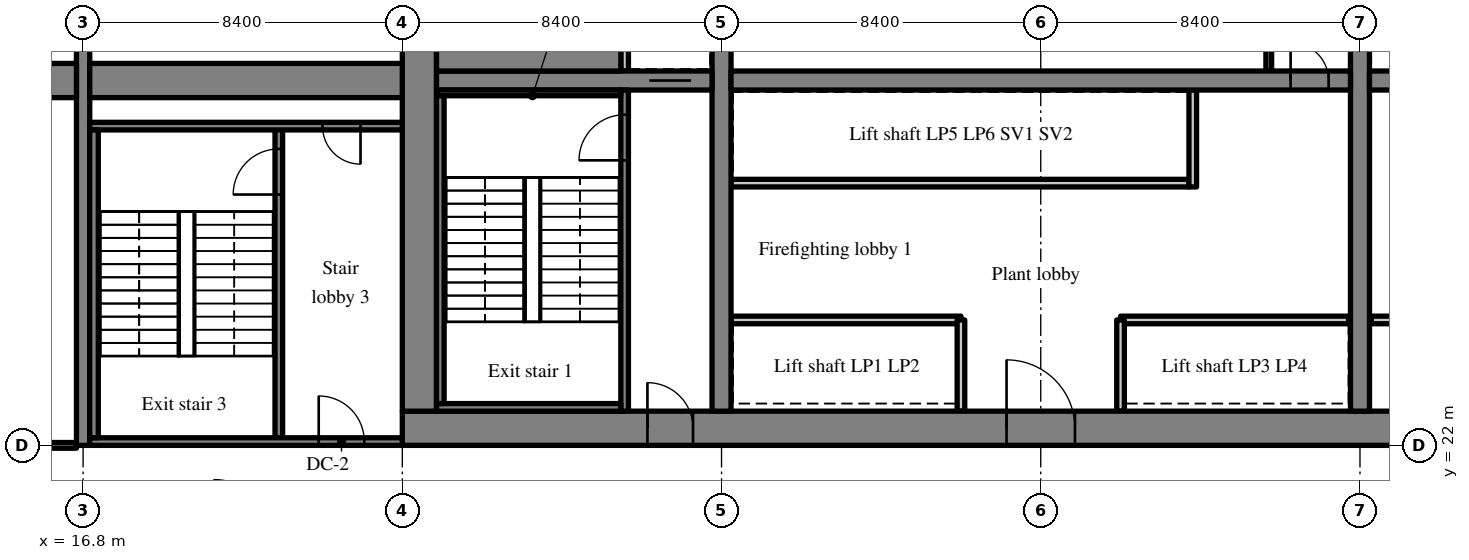
"""IFC4 building model, lengths in metres.
Left out: names, types, materials, properties, quantities, classifications, styles, units other than length and angle.
Written with IfcOpenShell. Run it as: python <this file> out.ifc"""

import sys

from ifc_helpers import new_model, si_unit, direction, frame, frame_2d, origin, place, context, subcontext, project, spatial, rectangle, extrude, source, transform, mapped, element, fill, save


model = new_model("IFC4")
c1 = context("Model", 3, precision=1e-05, world=origin(), true_north=direction((0.0, 1.0)))
c2 = subcontext(c1, "Body", "Model", "MODEL_VIEW")
j1 = project(units=[si_unit("LENGTHUNIT", "METRE"), si_unit("PLANEANGLEUNIT", "RADIAN")], contexts=[c1])
p1 = place(None, origin())
s1 = spatial("IfcSite", under=j1, at=p1, CompositionType="ELEMENT")
p2 = place(p1, origin())
s2 = spatial("IfcBuilding", under=s1, at=p2, CompositionType="ELEMENT")
p3 = place(p2, frame((0.0, 0.0, 140.8)))
s3 = spatial("IfcBuildingStorey", under=s2, at=p3, CompositionType="ELEMENT", Elevation=140.8)
m1 = source(origin(), c2, "Body", "SweptSolid", [
    extrude(rectangle(XDim=50.4, YDim=0.9, at=frame_2d((25.2, 0.0))), origin(), (0.0, 0.0, 1.0), 5.12),
])
p4 = place(p3, frame((25.2, 22.45, 0.0), z_axis=(0.0, 0.0, 1.0), x_axis=(1.0, 0.0, 0.0)))
e1 = element("IfcWall", 1, at=p4, inside=s3, PredefinedType="SHEAR", context=c2, shape_type="MappedRepresentation", body=[
    mapped(m1, transform((0.0, 0.0, 0.0), scale=1.0)),
])
m2 = source(origin(), c2, "Body", "SweptSolid", [
    extrude(rectangle(XDim=1.8, YDim=2.1, at=frame_2d((0.9, 1.05))), frame((0.0, 0.46, 0.0), z_axis=(0.0, -1.0, 0.0), x_axis=(1.0, 0.0, 0.0)), (0.0, 0.0, 1.0), 0.92),
])
p5 = place(p4, frame((15.9, 0.0, 0.0)))
e2 = element("IfcOpeningElement", 2, at=p5, cuts=e1, PredefinedType="OPENING", context=c2, shape_type="MappedRepresentation", body=[
    mapped(m2, transform((0.0, 0.0, 0.0), scale=1.0)),
])
p6 = place(p4, frame((32.7, 0.0, 0.0)))
e3 = element("IfcOpeningElement", 3, at=p6, cuts=e1, PredefinedType="OPENING", context=c2, shape_type="MappedRepresentation", body=[
    mapped(m2, transform((0.0, 0.0, 0.0), scale=1.0)),
])
m3 = source(origin(), c2, "Body", "SweptSolid", [
    extrude(rectangle(XDim=1.2, YDim=2.1, at=frame_2d((0.6, 1.05))), frame((0.0, 0.46, 0.0), z_axis=(0.0, -1.0, 0.0), x_axis=(1.0, 0.0, 0.0)), (0.0, 0.0, 1.0), 0.92),
])
p7 = place(p4, frame((6.45, 0.0, 0.0)))
e4 = element("IfcOpeningElement", 4, at=p7, cuts=e1, PredefinedType="OPENING", context=c2, shape_type="MappedRepresentation", body=[
    mapped(m3, transform((0.0, 0.0, 0.0), scale=1.0)),
])
p8 = place(p4, frame((47.775, 0.0, 0.0)))
e5 = element("IfcOpeningElement", 5, at=p8, cuts=e1, PredefinedType="OPENING", context=c2, shape_type="MappedRepresentation", body=[
    mapped(m3, transform((0.0, 0.0, 0.0), scale=1.0)),
])
m4 = source(origin(), c2, "Body", "SweptSolid", [
    extrude(rectangle(XDim=18.2, YDim=0.9, at=frame_2d((9.1, 0.0))), origin(), (0.0, 0.0, 1.0), 5.12),
])
p9 = place(p3, frame((25.65, 22.9, 0.0), z_axis=(0.0, 0.0, 1.0), x_axis=(0.0, 1.0, 0.0)))
e6 = element("IfcWall", 6, at=p9, inside=s3, PredefinedType="SHEAR", context=c2, shape_type="MappedRepresentation", body=[
    mapped(m4, transform((0.0, 0.0, 0.0), scale=1.0)),
])
p10 = place(p9, frame((16.3, 0.0, 0.0)))
e7 = element("IfcOpeningElement", 7, at=p10, cuts=e6, PredefinedType="OPENING", context=c2, shape_type="MappedRepresentation", body=[
    mapped(m3, transform((0.0, 0.0, 0.0), scale=1.0)),
])
m5 = source(origin(), c2, "Body", "SweptSolid", [
    extrude(rectangle(XDim=18.2, YDim=0.5, at=frame_2d((9.1, 0.0))), origin(), (0.0, 0.0, 1.0), 5.12),
])
p11 = place(p3, frame((33.6, 22.9, 0.0), z_axis=(0.0, 0.0, 1.0), x_axis=(0.0, 1.0, 0.0)))
e8 = element("IfcWall", 8, at=p11, inside=s3, PredefinedType="SHEAR", context=c2, shape_type="MappedRepresentation", body=[
    mapped(m5, transform((0.0, 0.0, 0.0), scale=1.0)),
])
m6 = source(origin(), c2, "Body", "SweptSolid", [
    extrude(rectangle(XDim=1.1, YDim=2.1, at=frame_2d((0.55, 1.05))), frame((0.0, 0.26, 0.0), z_axis=(0.0, -1.0, 0.0), x_axis=(1.0, 0.0, 0.0)), (0.0, 0.0, 1.0), 0.52),
])
p12 = place(p11, frame((12.55, 0.0, 0.0)))
e9 = element("IfcOpeningElement", 9, at=p12, cuts=e8, PredefinedType="OPENING", context=c2, shape_type="MappedRepresentation", body=[
    mapped(m6, transform((0.0, 0.0, 0.0), scale=1.0)),
])
p13 = place(p3, frame((50.4, 22.9, 0.0), z_axis=(0.0, 0.0, 1.0), x_axis=(0.0, 1.0, 0.0)))
e10 = element("IfcWall", 10, at=p13, inside=s3, PredefinedType="SHEAR", context=c2, shape_type="MappedRepresentation", body=[
    mapped(m5, transform((0.0, 0.0, 0.0), scale=1.0)),
])
p14 = place(p13, frame((12.55, 0.0, 0.0)))
e11 = element("IfcOpeningElement", 11, at=p14, cuts=e10, PredefinedType="OPENING", context=c2, shape_type="MappedRepresentation", body=[
    mapped(m6, transform((0.0, 0.0, 0.0), scale=1.0)),
])
m7 = source(origin(), c2, "Body", "SweptSolid", [
    extrude(rectangle(XDim=7.25, YDim=0.5, at=frame_2d((3.625, 0.0))), origin(), (0.0, 0.0, 1.0), 5.12),
])
p15 = place(p3, frame((26.1, 31.6, 0.0), z_axis=(0.0, 0.0, 1.0), x_axis=(1.0, 0.0, 0.0)))
e12 = element("IfcWall", 12, at=p15, inside=s3, PredefinedType="SHEAR", context=c2, shape_type="MappedRepresentation", body=[
    mapped(m7, transform((0.0, 0.0, 0.0), scale=1.0)),
])
p16 = place(p15, frame((5.6, 0.0, 0.0)))
e13 = element("IfcOpeningElement", 13, at=p16, cuts=e12, PredefinedType="OPENING", context=c2, shape_type="MappedRepresentation", body=[
    mapped(m6, transform((0.0, 0.0, 0.0), scale=1.0)),
])
m8 = source(origin(), c2, "Body", "SweptSolid", [
    extrude(rectangle(XDim=16.3, YDim=0.5, at=frame_2d((8.15, 0.0))), origin(), (0.0, 0.0, 1.0), 5.12),
])
p17 = place(p3, frame((33.85, 31.6, 0.0), z_axis=(0.0, 0.0, 1.0), x_axis=(1.0, 0.0, 0.0)))
e14 = element("IfcWall", 14, at=p17, inside=s3, PredefinedType="SHEAR", context=c2, shape_type="MappedRepresentation", body=[
    mapped(m8, transform((0.0, 0.0, 0.0), scale=1.0)),
])
m9 = source(origin(), c2, "Body", "SweptSolid", [
    extrude(rectangle(XDim=1.0, YDim=2.1, at=frame_2d((0.5, 1.05))), frame((0.0, 0.26, 0.0), z_axis=(0.0, -1.0, 0.0), x_axis=(1.0, 0.0, 0.0)), (0.0, 0.0, 1.0), 0.52),
])
p18 = place(p17, frame((14.725, 0.0, 0.0)))
e15 = element("IfcOpeningElement", 15, at=p18, cuts=e14, PredefinedType="OPENING", context=c2, shape_type="MappedRepresentation", body=[
    mapped(m9, transform((0.0, 0.0, 0.0), scale=1.0)),
])
m10 = source(origin(), c2, "Body", "SweptSolid", [
    extrude(rectangle(XDim=16.3, YDim=0.5, at=frame_2d((8.15, 0.0))), origin(), (0.0, 0.0, 1.0), 5.12),
])
p19 = place(p3, frame((50.65, 31.6, 0.0), z_axis=(0.0, 0.0, 1.0), x_axis=(1.0, 0.0, 0.0)))
e16 = element("IfcWall", 16, at=p19, inside=s3, PredefinedType="SHEAR", context=c2, shape_type="MappedRepresentation", body=[
    mapped(m10, transform((0.0, 0.0, 0.0), scale=1.0)),
])
p20 = place(p19, frame((0.575, 0.0, 0.0)))
e17 = element("IfcOpeningElement", 17, at=p20, cuts=e16, PredefinedType="OPENING", context=c2, shape_type="MappedRepresentation", body=[
    mapped(m9, transform((0.0, 0.0, 0.0), scale=1.0)),
])
m11 = source(origin(), c2, "Body", "SweptSolid", [
    extrude(rectangle(XDim=20.0, YDim=0.35, at=frame_2d((10.0, 0.0))), origin(), (0.0, 0.0, 1.0), 5.12),
])
p21 = place(p3, frame((16.8, 22.0, 0.0), z_axis=(0.0, 0.0, 1.0), x_axis=(0.0, 1.0, 0.0)))
e18 = element("IfcWall", 18, at=p21, inside=s3, PredefinedType="SHEAR", context=c2, shape_type="MappedRepresentation", body=[
    mapped(m11, transform((0.0, 0.0, 0.0), scale=1.0)),
])
m12 = source(origin(), c2, "Body", "SweptSolid", [
    extrude(rectangle(XDim=1.2, YDim=2.1, at=frame_2d((0.6, 1.05))), frame((0.0, 0.185, 0.0), z_axis=(0.0, -1.0, 0.0), x_axis=(1.0, 0.0, 0.0)), (0.0, 0.0, 1.0), 0.37),
])
p22 = place(p21, frame((13.4, 0.0, 0.0)))
e19 = element("IfcOpeningElement", 19, at=p22, cuts=e18, PredefinedType="OPENING", context=c2, shape_type="MappedRepresentation", body=[
    mapped(m12, transform((0.0, 0.0, 0.0), scale=1.0)),
])
m13 = source(origin(), c2, "Body", "SweptSolid", [
    extrude(rectangle(XDim=8.05, YDim=0.9, at=frame_2d((4.025, 0.0))), origin(), (0.0, 0.0, 1.0), 5.12),
])
p23 = place(p3, frame((8.575, 31.6, 0.0), z_axis=(0.0, 0.0, 1.0), x_axis=(1.0, 0.0, 0.0)))
e20 = element("IfcWall", 20, at=p23, inside=s3, PredefinedType="SHEAR", context=c2, shape_type="MappedRepresentation", body=[
    mapped(m13, transform((0.0, 0.0, 0.0), scale=1.0)),
])
m14 = source(origin(), c2, "Body", "SweptSolid", [
    extrude(rectangle(XDim=8.225, YDim=0.9, at=frame_2d((4.112, 0.0))), origin(), (0.0, 0.0, 1.0), 5.12),
])
p24 = place(p3, frame((16.975, 31.6, 0.0), z_axis=(0.0, 0.0, 1.0), x_axis=(1.0, 0.0, 0.0)))
e21 = element("IfcWall", 21, at=p24, inside=s3, PredefinedType="SHEAR", context=c2, shape_type="MappedRepresentation", body=[
    mapped(m14, transform((0.0, 0.0, 0.0), scale=1.0)),
])
m15 = source(origin(), c2, "Body", "SweptSolid", [
    extrude(rectangle(XDim=6.05, YDim=0.2, at=frame_2d((3.025, 0.0))), origin(), (0.0, 0.0, 1.0), 5.12),
])
p25 = place(p3, frame((33.85, 25.3, 0.0), z_axis=(0.0, 0.0, 1.0), x_axis=(1.0, 0.0, 0.0)))
e22 = element("IfcWall", 22, at=p25, inside=s3, PredefinedType="SOLIDWALL", context=c2, shape_type="MappedRepresentation", body=[
    mapped(m15, transform((0.0, 0.0, 0.0), scale=1.0)),
])
m16 = source(origin(), c2, "Body", "SweptSolid", [
    extrude(rectangle(XDim=6.0, YDim=0.2, at=frame_2d((3.0, 0.0))), origin(), (0.0, 0.0, 1.0), 5.12),
])
p26 = place(p3, frame((44.1, 25.3, 0.0), z_axis=(0.0, 0.0, 1.0), x_axis=(1.0, 0.0, 0.0)))
e23 = element("IfcWall", 23, at=p26, inside=s3, PredefinedType="SOLIDWALL", context=c2, shape_type="MappedRepresentation", body=[
    mapped(m16, transform((0.0, 0.0, 0.0), scale=1.0)),
])
m17 = source(origin(), c2, "Body", "SweptSolid", [
    extrude(rectangle(XDim=12.05, YDim=0.2, at=frame_2d((6.025, 0.0))), origin(), (0.0, 0.0, 1.0), 5.12),
])
p27 = place(p3, frame((33.85, 28.9, 0.0), z_axis=(0.0, 0.0, 1.0), x_axis=(1.0, 0.0, 0.0)))
e24 = element("IfcWall", 24, at=p27, inside=s3, PredefinedType="SOLIDWALL", context=c2, shape_type="MappedRepresentation", body=[
    mapped(m17, transform((0.0, 0.0, 0.0), scale=1.0)),
])
m18 = source(origin(), c2, "Body", "SweptSolid", [
    extrude(rectangle(XDim=2.4, YDim=0.2, at=frame_2d((1.2, 0.0))), origin(), (0.0, 0.0, 1.0), 5.12),
])
for number, where, z_axis, x_axis in (
    (25, (39.9, 22.9, 0.0), (0.0, 0.0, 1.0), (0.0, 1.0, 0.0)),
    (26, (44.1, 22.9, 0.0), (0.0, 0.0, 1.0), (0.0, 1.0, 0.0)),
):
    element("IfcWall", number, at=place(p3, frame(where, z_axis=z_axis, x_axis=x_axis)), inside=s3, PredefinedType="SOLIDWALL", context=c2, shape_type="MappedRepresentation", body=[
        mapped(m18, transform((0.0, 0.0, 0.0), scale=1.0)),
    ])
m19 = source(origin(), c2, "Body", "SweptSolid", [
    extrude(rectangle(XDim=2.55, YDim=0.2, at=frame_2d((1.275, 0.0))), origin(), (0.0, 0.0, 1.0), 5.12),
])
p28 = place(p3, frame((46.0, 28.8, 0.0), z_axis=(0.0, 0.0, 1.0), x_axis=(0.0, 1.0, 0.0)))
e27 = element("IfcWall", 27, at=p28, inside=s3, PredefinedType="SOLIDWALL", context=c2, shape_type="MappedRepresentation", body=[
    mapped(m19, transform((0.0, 0.0, 0.0), scale=1.0)),
])
m20 = source(origin(), c2, "Body", "SweptSolid", [
    extrude(rectangle(XDim=3.15, YDim=0.15, at=frame_2d((1.575, 0.0))), origin(), (0.0, 0.0, 1.0), 5.12),
])
p29 = place(p3, frame((48.0, 31.85, 0.0), z_axis=(0.0, 0.0, 1.0), x_axis=(0.0, 1.0, 0.0)))
e28 = element("IfcWall", 28, at=p29, inside=s3, PredefinedType="PARTITIONING", context=c2, shape_type="MappedRepresentation", body=[
    mapped(m20, transform((0.0, 0.0, 0.0), scale=1.0)),
])
p30 = place(p3, frame((56.7, 25.3, 0.0), z_axis=(0.0, 0.0, 1.0), x_axis=(-1.0, 0.0, 0.0)))
e29 = element("IfcWall", 29, at=p30, inside=s3, PredefinedType="SOLIDWALL", context=c2, shape_type="MappedRepresentation", body=[
    mapped(m16, transform((0.0, 0.0, 0.0), scale=1.0)),
])
m21 = source(origin(), c2, "Body", "SweptSolid", [
    extrude(rectangle(XDim=8.45, YDim=0.2, at=frame_2d((4.225, 0.0))), origin(), (0.0, 0.0, 1.0), 5.12),
])
p31 = place(p3, frame((31.05, 22.9, 0.0), z_axis=(0.0, 0.0, 1.0), x_axis=(0.0, 1.0, 0.0)))
e30 = element("IfcWall", 30, at=p31, inside=s3, PredefinedType="SOLIDWALL", context=c2, shape_type="MappedRepresentation", body=[
    mapped(m21, transform((0.0, 0.0, 0.0), scale=1.0)),
])
m22 = source(origin(), c2, "Body", "SweptSolid", [
    extrude(rectangle(XDim=1.2, YDim=2.1, at=frame_2d((0.6, 1.05))), frame((0.0, 0.11, 0.0), z_axis=(0.0, -1.0, 0.0), x_axis=(1.0, 0.0, 0.0)), (0.0, 0.0, 1.0), 0.22),
])
p32 = place(p31, frame((6.6, 0.0, 0.0)))
e31 = element("IfcOpeningElement", 31, at=p32, cuts=e30, PredefinedType="OPENING", context=c2, shape_type="MappedRepresentation", body=[
    mapped(m22, transform((0.0, 0.0, 0.0), scale=1.0)),
])
m23 = source(origin(), c2, "Body", "SweptSolid", [
    extrude(rectangle(XDim=1.75, YDim=0.2, at=frame_2d((0.875, 0.0))), origin(), (0.0, 0.0, 1.0), 5.12),
])
p33 = place(p3, frame((31.05, 31.85, 0.0), z_axis=(0.0, 0.0, 1.0), x_axis=(0.0, 1.0, 0.0)))
e32 = element("IfcWall", 32, at=p33, inside=s3, PredefinedType="SOLIDWALL", context=c2, shape_type="MappedRepresentation", body=[
    mapped(m23, transform((0.0, 0.0, 0.0), scale=1.0)),
])
m24 = source(origin(), c2, "Body", "SweptSolid", [
    extrude(rectangle(XDim=8.3, YDim=0.2, at=frame_2d((4.15, 0.0))), origin(), (0.0, 0.0, 1.0), 5.12),
])
p34 = place(p3, frame((21.95, 22.1, 0.0), z_axis=(0.0, 0.0, 1.0), x_axis=(0.0, 1.0, 0.0)))
e33 = element("IfcWall", 33, at=p34, inside=s3, PredefinedType="SOLIDWALL", context=c2, shape_type="MappedRepresentation", body=[
    mapped(m24, transform((0.0, 0.0, 0.0), scale=1.0)),
])
p35 = place(p34, frame((6.5, 0.0, 0.0)))
e34 = element("IfcOpeningElement", 34, at=p35, cuts=e33, PredefinedType="OPENING", context=c2, shape_type="MappedRepresentation", body=[
    mapped(m22, transform((0.0, 0.0, 0.0), scale=1.0)),
])
m25 = source(origin(), c2, "Body", "SweptSolid", [
    extrude(rectangle(XDim=8.225, YDim=0.2, at=frame_2d((4.112, 0.0))), origin(), (0.0, 0.0, 1.0), 5.12),
])
p36 = place(p3, frame((16.975, 22.1, 0.0), z_axis=(0.0, 0.0, 1.0), x_axis=(1.0, 0.0, 0.0)))
e35 = element("IfcWall", 35, at=p36, inside=s3, PredefinedType="SOLIDWALL", context=c2, shape_type="MappedRepresentation", body=[
    mapped(m25, transform((0.0, 0.0, 0.0), scale=1.0)),
])
p37 = place(p36, frame((6.025, 0.0, 0.0)))
e36 = element("IfcOpeningElement", 36, at=p37, cuts=e35, PredefinedType="OPENING", context=c2, shape_type="MappedRepresentation", body=[
    mapped(m22, transform((0.0, 0.0, 0.0), scale=1.0)),
])
p38 = place(p3, frame((25.2, 30.4, 0.0), z_axis=(0.0, 0.0, 1.0), x_axis=(-1.0, 0.0, 0.0)))
e37 = element("IfcWall", 37, at=p38, inside=s3, PredefinedType="SOLIDWALL", context=c2, shape_type="MappedRepresentation", body=[
    mapped(m25, transform((0.0, 0.0, 0.0), scale=1.0)),
])
m26 = source(origin(), c2, "Body", "SweptSolid", [
    extrude(rectangle(XDim=1.0, YDim=2.1, at=frame_2d((0.5, 1.05))), frame((0.0, 0.11, 0.0), z_axis=(0.0, -1.0, 0.0), x_axis=(1.0, 0.0, 0.0)), (0.0, 0.0, 1.0), 0.22),
])
p39 = place(p38, frame((1.1, 0.0, 0.0)))
e38 = element("IfcOpeningElement", 38, at=p39, cuts=e37, PredefinedType="OPENING", context=c2, shape_type="MappedRepresentation", body=[
    mapped(m26, transform((0.0, 0.0, 0.0), scale=1.0)),
])
m27 = source(origin(), c2, "Body", "SweptSolid", [
    extrude(rectangle(XDim=4.85, YDim=0.2, at=frame_2d((2.425, 0.0))), origin(), (0.0, 0.0, 1.0), 5.12),
])
p40 = place(p3, frame((26.1, 23.0, 0.0), z_axis=(0.0, 0.0, 1.0), x_axis=(1.0, 0.0, 0.0)))
e39 = element("IfcWall", 39, at=p40, inside=s3, PredefinedType="SOLIDWALL", context=c2, shape_type="MappedRepresentation", body=[
    mapped(m27, transform((0.0, 0.0, 0.0), scale=1.0)),
])
m28 = source(origin(), c2, "Body", "SweptSolid", [
    extrude(rectangle(XDim=4.85, YDim=0.15, at=frame_2d((2.425, 0.0))), origin(), (0.0, 0.0, 1.0), 5.12),
])
p41 = place(p3, frame((26.1, 31.275, 0.0), z_axis=(0.0, 0.0, 1.0), x_axis=(1.0, 0.0, 0.0)))
e40 = element("IfcWall", 40, at=p41, inside=s3, PredefinedType="SOLIDWALL", context=c2, shape_type="MappedRepresentation", body=[
    mapped(m28, transform((0.0, 0.0, 0.0), scale=1.0)),
])
m29 = source(origin(), c2, "Body", "SweptSolid", [
    extrude(rectangle(XDim=8.1, YDim=0.2, at=frame_2d((4.05, 0.0))), origin(), (0.0, 0.0, 1.0), 5.12),
])
p42 = place(p3, frame((26.2, 23.1, 0.0), z_axis=(0.0, 0.0, 1.0), x_axis=(0.0, 1.0, 0.0)))
e41 = element("IfcWall", 41, at=p42, inside=s3, PredefinedType="SOLIDWALL", context=c2, shape_type="MappedRepresentation", body=[
    mapped(m29, transform((0.0, 0.0, 0.0), scale=1.0)),
])
m30 = source(origin(), c2, "Body", "SweptSolid", [
    extrude(rectangle(XDim=8.1, YDim=0.225, at=frame_2d((4.05, 0.0))), origin(), (0.0, 0.0, 1.0), 5.12),
])
p43 = place(p3, frame((17.087, 22.2, 0.0), z_axis=(0.0, 0.0, 1.0), x_axis=(0.0, 1.0, 0.0)))
e42 = element("IfcWall", 42, at=p43, inside=s3, PredefinedType="SOLIDWALL", context=c2, shape_type="MappedRepresentation", body=[
    mapped(m30, transform((0.0, 0.0, 0.0), scale=1.0)),
])
m31 = source(origin(), c2, "Body", "SweptSolid", [
    extrude(rectangle(XDim=4.85, YDim=0.95, at=frame_2d((2.425, 0.0))), origin(), (0.0, 0.0, 1.0), 5.12),
])
p44 = place(p3, frame((26.1, 32.325, 0.0), z_axis=(0.0, 0.0, 1.0), x_axis=(1.0, 0.0, 0.0)))
e43 = element("IfcWall", 43, at=p44, inside=s3, PredefinedType="SOLIDWALL", context=c2, shape_type="MappedRepresentation", body=[
    mapped(m31, transform((0.0, 0.0, 0.0), scale=1.0)),
])
m32 = source(origin(), c2, "Body", "SweptSolid", [
    extrude(rectangle(XDim=8.05, YDim=0.15, at=frame_2d((4.025, 0.0))), origin(), (0.0, 0.0, 1.0), 4.37),
])
p45 = place(p3, frame((8.575, 22.0, 0.0), z_axis=(0.0, 0.0, 1.0), x_axis=(1.0, 0.0, 0.0)))
e44 = element("IfcWall", 44, at=p45, inside=s3, PredefinedType="PARTITIONING", context=c2, shape_type="MappedRepresentation", body=[
    mapped(m32, transform((0.0, 0.0, 0.0), scale=1.0)),
])
m33 = source(origin(), c2, "Body", "SweptSolid", [
    extrude(rectangle(XDim=1.2, YDim=2.1, at=frame_2d((0.6, 1.05))), frame((0.0, 0.085, 0.0), z_axis=(0.0, -1.0, 0.0), x_axis=(1.0, 0.0, 0.0)), (0.0, 0.0, 1.0), 0.17),
])
p46 = place(p45, frame((3.425, 0.0, 0.0)))
e45 = element("IfcOpeningElement", 45, at=p46, cuts=e44, PredefinedType="OPENING", context=c2, shape_type="MappedRepresentation", body=[
    mapped(m33, transform((0.0, 0.0, 0.0), scale=1.0)),
])
m34 = source(origin(), c2, "Body", "SweptSolid", [
    extrude(rectangle(XDim=1.8, YDim=2.1, at=frame_2d((0.9, 1.05))), frame((0.0, 0.375, 0.0), z_axis=(0.0, -1.0, 0.0), x_axis=(1.0, 0.0, 0.0)), (0.0, 0.0, 1.0), 0.05),
])
p47 = place(p5, origin())
e46 = element("IfcDoor", 46, at=p47, inside=s3, OperationType="DOUBLE_DOOR_SINGLE_SWING", PredefinedType="DOOR", context=c2, shape_type="MappedRepresentation", body=[
    mapped(m34, transform((0.0, 0.0, 0.0), scale=1.0)),
])
fill(e2, e46)
m35 = source(origin(), c2, "Body", "SweptSolid", [
    extrude(rectangle(XDim=1.0, YDim=2.1, at=frame_2d((0.5, 1.05))), frame((0.0, 0.025, 0.0), z_axis=(0.0, -1.0, 0.0), x_axis=(1.0, 0.0, 0.0)), (0.0, 0.0, 1.0), 0.05),
])
p48 = place(p18, origin())
e47 = element("IfcDoor", 47, at=p48, inside=s3, OperationType="SINGLE_SWING_LEFT", PredefinedType="DOOR", context=c2, shape_type="MappedRepresentation", body=[
    mapped(m35, transform((0.0, 0.0, 0.0), scale=1.0)),
])
fill(e15, e47)
m36 = source(origin(), c2, "Body", "SweptSolid", [
    extrude(rectangle(XDim=1.2, YDim=2.1, at=frame_2d((0.6, 1.05))), frame((0.0, 0.025, 0.0), z_axis=(0.0, -1.0, 0.0), x_axis=(1.0, 0.0, 0.0)), (0.0, 0.0, 1.0), 0.05),
])
p49 = place(p32, origin())
e48 = element("IfcDoor", 48, at=p49, inside=s3, OperationType="SINGLE_SWING_LEFT", PredefinedType="DOOR", context=c2, shape_type="MappedRepresentation", body=[
    mapped(m36, transform((0.0, 0.0, 0.0), scale=1.0)),
])
fill(e31, e48)
m37 = source(origin(), c2, "Body", "SweptSolid", [
    extrude(rectangle(XDim=1.2, YDim=2.1, at=frame_2d((0.6, 1.05))), frame((0.0, 0.375, 0.0), z_axis=(0.0, -1.0, 0.0), x_axis=(1.0, 0.0, 0.0)), (0.0, 0.0, 1.0), 0.05),
])
p50 = place(p7, origin())
e49 = element("IfcDoor", 49, at=p50, inside=s3, OperationType="SINGLE_SWING_LEFT", PredefinedType="DOOR", context=c2, shape_type="MappedRepresentation", body=[
    mapped(m37, transform((0.0, 0.0, 0.0), scale=1.0)),
])
fill(e4, e49)
m38 = source(origin(), c2, "Body", "SweptSolid", [
    extrude(rectangle(XDim=1.1, YDim=2.1, at=frame_2d((0.55, 1.05))), frame((0.0, 0.025, 0.0), z_axis=(0.0, -1.0, 0.0), x_axis=(1.0, 0.0, 0.0)), (0.0, 0.0, 1.0), 0.05),
])
p51 = place(p16, origin())
e50 = element("IfcDoor", 50, at=p51, inside=s3, OperationType="SLIDING_TO_RIGHT", PredefinedType="DOOR", context=c2, shape_type="MappedRepresentation", body=[
    mapped(m38, transform((0.0, 0.0, 0.0), scale=1.0)),
])
fill(e13, e50)
p52 = place(p35, origin())
e51 = element("IfcDoor", 51, at=p52, inside=s3, OperationType="SINGLE_SWING_LEFT", PredefinedType="DOOR", context=c2, shape_type="MappedRepresentation", body=[
    mapped(m36, transform((0.0, 0.0, 0.0), scale=1.0)),
])
fill(e34, e51)
p53 = place(p37, origin())
e52 = element("IfcDoor", 52, at=p53, inside=s3, OperationType="SINGLE_SWING_LEFT", PredefinedType="DOOR", context=c2, shape_type="MappedRepresentation", body=[
    mapped(m36, transform((0.0, 0.0, 0.0), scale=1.0)),
])
fill(e36, e52)
p54 = place(p39, origin())
e53 = element("IfcDoor", 53, at=p54, inside=s3, OperationType="SINGLE_SWING_LEFT", PredefinedType="DOOR", context=c2, shape_type="MappedRepresentation", body=[
    mapped(m35, transform((0.0, 0.0, 0.0), scale=1.0)),
])
fill(e38, e53)
save(model, sys.argv[1])
